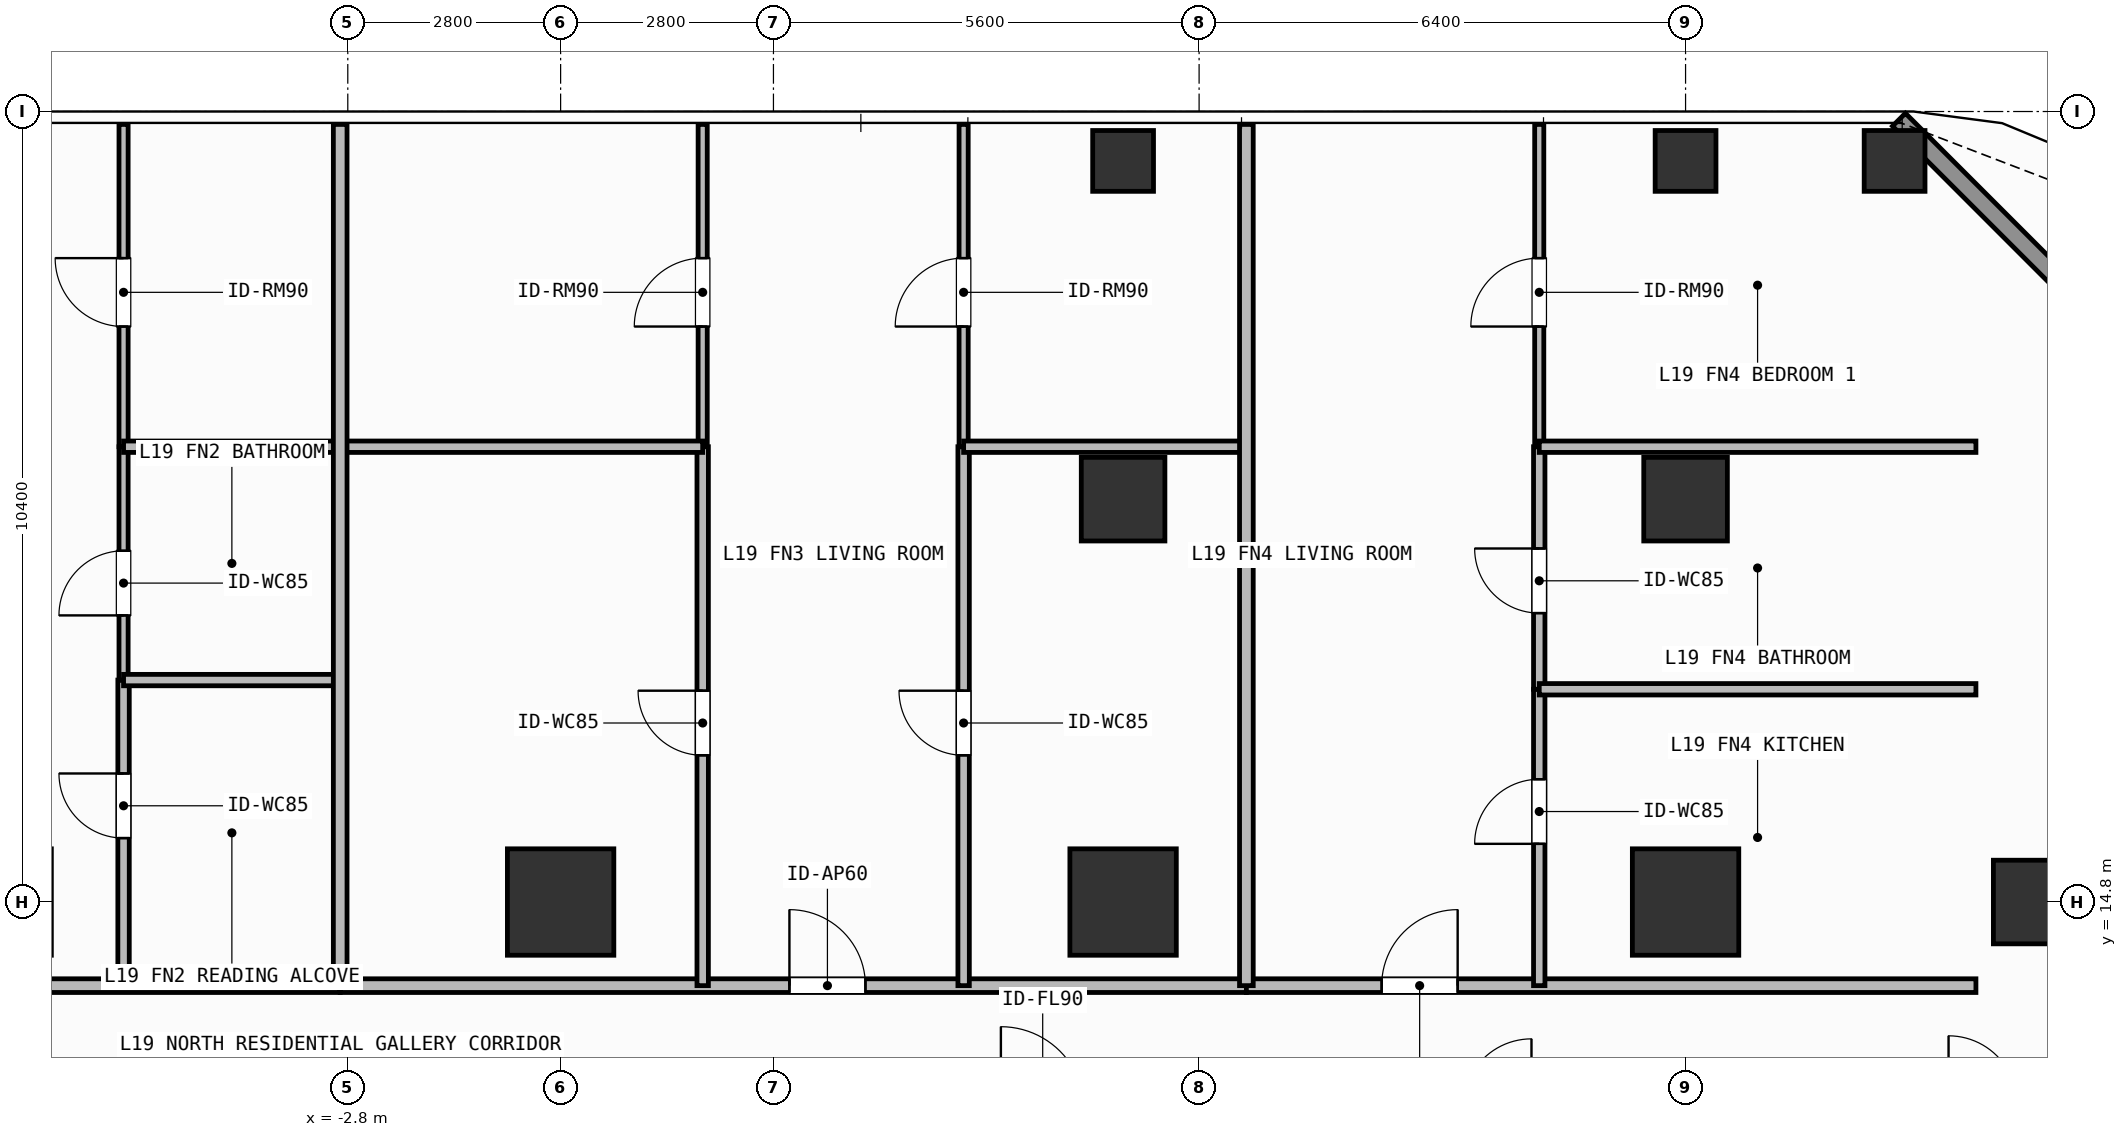
"""IFC4 building model, lengths in metres.
Left out: names, types, materials, properties, quantities, classifications, styles, units other than length and angle.
Written with IfcOpenShell. Run it as: python <this file> out.ifc"""

import sys

from ifc_helpers import new_model, si_unit, direction, frame, frame_2d, origin, origin_2d, place, context, subcontext, project, spatial, rectangle, hollow_rectangle, extrude, element, fill, save


model = new_model("IFC4")
c1 = context("Model", 3, precision=1e-05, world=origin(), true_north=direction((0.0, 1.0)))
c2 = subcontext(c1, "Body", "Model", "MODEL_VIEW")
j1 = project(units=[si_unit("LENGTHUNIT", "METRE"), si_unit("PLANEANGLEUNIT", "RADIAN")], contexts=[c1])
p1 = place(None, origin())
s1 = spatial("IfcSite", under=j1, at=p1, CompositionType="ELEMENT")
p2 = place(p1, origin())
s2 = spatial("IfcBuilding", under=s1, at=p2, CompositionType="ELEMENT")
p3 = place(p2, frame((0.0, 0.0, 73.5)))
s3 = spatial("IfcBuildingStorey", under=s2, at=p3, CompositionType="ELEMENT", Elevation=73.5)
for number, where, z_axis, x_axis in (
    (1, (0.0, 14.8, 0.0), (0.0, 0.0, 1.0), (1.0, 0.0, 0.0)),
    (2, (7.4, 14.8, 0.0), (0.0, 0.0, 1.0), (1.0, 0.0, 0.0)),
    (3, (14.8, 14.8, 0.0), (0.0, 0.0, 1.0), (1.0, 0.0, 0.0)),
):
    element("IfcColumn", number, at=place(p3, frame(where, z_axis=z_axis, x_axis=x_axis)), inside=s3, PredefinedType="COLUMN", context=c2, shape_type="SweptSolid", body=[
        extrude(rectangle(XDim=1.4, YDim=1.4, at=origin_2d()), origin(), (0.0, 0.0, 1.0), 3.9),
    ])
for number, where, z_axis, x_axis in (
    (4, (19.4, 14.8, 0.0), (0.0, 0.0, 1.0), (1.0, 0.0, 0.0)),
    (5, (7.4, 20.1, 0.0), (0.0, 0.0, 1.0), (1.0, 0.0, 0.0)),
    (6, (14.8, 20.1, 0.0), (0.0, 0.0, 1.0), (1.0, 0.0, 0.0)),
):
    element("IfcColumn", number, at=place(p3, frame(where, z_axis=z_axis, x_axis=x_axis)), inside=s3, PredefinedType="COLUMN", context=c2, shape_type="SweptSolid", body=[
        extrude(rectangle(XDim=1.1, YDim=1.1, at=origin_2d()), origin(), (0.0, 0.0, 1.0), 3.9),
    ])
for number, where, z_axis, x_axis in (
    (7, (17.55, 24.55, 0.0), (0.0, 0.0, 1.0), (1.0, 0.0, 0.0)),
    (8, (7.4, 24.55, 0.0), (0.0, 0.0, 1.0), (1.0, 0.0, 0.0)),
    (9, (14.8, 24.55, 0.0), (0.0, 0.0, 1.0), (1.0, 0.0, 0.0)),
):
    element("IfcColumn", number, at=place(p3, frame(where, z_axis=z_axis, x_axis=x_axis)), inside=s3, PredefinedType="COLUMN", context=c2, shape_type="SweptSolid", body=[
        extrude(hollow_rectangle(XDim=0.8, YDim=0.8, WallThickness=0.036, at=origin_2d()), origin(), (0.0, 0.0, 1.0), 3.9),
    ])
p4 = place(p3, frame((17.608, 25.092, 0.0), z_axis=(0.0, 0.0, 1.0), x_axis=(0.707106781187, -0.707106781187, 0.0)))
e10 = element("IfcWall", 10, at=p4, inside=s3, PredefinedType="SOLIDWALL", context=c2, shape_type="SweptSolid", body=[
    extrude(rectangle(XDim=6.484, YDim=0.24, at=frame_2d((3.242, 0.0))), origin(), (0.0, 0.0, 1.0), 3.6),
])
p5 = place(p3, frame((-14.951, 13.7, 0.0), z_axis=(0.0, 0.0, 1.0), x_axis=(1.0, 0.0, 0.0)))
e11 = element("IfcWall", 11, at=p5, inside=s3, PredefinedType="PARTITIONING", context=c2, shape_type="SweptSolid", body=[
    extrude(rectangle(XDim=12.051, YDim=0.18, at=frame_2d((6.025, 0.0))), origin(), (0.0, 0.0, 1.0), 3.6),
])
p6 = place(p5, frame((5.704, 0.0, 0.0)))
e12 = element("IfcOpeningElement", 12, at=p6, cuts=e11, PredefinedType="OPENING", context=c2, shape_type="SweptSolid", body=[
    extrude(rectangle(XDim=1.0, YDim=2.2, at=frame_2d((0.5, 1.1))), frame((0.0, 0.1, 0.0), z_axis=(0.0, -1.0, 0.0), x_axis=(1.0, 0.0, 0.0)), (0.0, 0.0, 1.0), 0.2),
])
p7 = place(p3, frame((-5.75, 13.7, 0.0), z_axis=(0.0, 0.0, 1.0), x_axis=(0.0, 1.0, 0.0)))
e13 = element("IfcWall", 13, at=p7, inside=s3, PredefinedType="PARTITIONING", context=c2, shape_type="SweptSolid", body=[
    extrude(rectangle(XDim=4.02, YDim=0.15, at=frame_2d((2.01, 0.0))), origin(), (0.0, 0.0, 1.0), 3.6),
])
p8 = place(p7, frame((1.941, 0.0, 0.0)))
e14 = element("IfcOpeningElement", 14, at=p8, cuts=e13, PredefinedType="OPENING", context=c2, shape_type="SweptSolid", body=[
    extrude(rectangle(XDim=0.85, YDim=2.1, at=frame_2d((0.425, 1.05))), frame((0.0, 0.085, 0.0), z_axis=(0.0, -1.0, 0.0), x_axis=(1.0, 0.0, 0.0)), (0.0, 0.0, 1.0), 0.17),
])
p9 = place(p3, frame((-5.75, 17.72, 0.0), z_axis=(0.0, 0.0, 1.0), x_axis=(0.0, 1.0, 0.0)))
e15 = element("IfcWall", 15, at=p9, inside=s3, PredefinedType="PARTITIONING", context=c2, shape_type="SweptSolid", body=[
    extrude(rectangle(XDim=3.07, YDim=0.12, at=frame_2d((1.535, 0.0))), origin(), (0.0, 0.0, 1.0), 3.6),
])
p10 = place(p9, frame((0.851, 0.0, 0.0)))
e16 = element("IfcOpeningElement", 16, at=p10, cuts=e15, PredefinedType="OPENING", context=c2, shape_type="SweptSolid", body=[
    extrude(rectangle(XDim=0.85, YDim=2.1, at=frame_2d((0.425, 1.05))), frame((0.0, 0.07, 0.0), z_axis=(0.0, -1.0, 0.0), x_axis=(1.0, 0.0, 0.0)), (0.0, 0.0, 1.0), 0.14),
])
p11 = place(p3, frame((-5.75, 20.79, 0.0), z_axis=(0.0, 0.0, 1.0), x_axis=(0.0, 1.0, 0.0)))
e17 = element("IfcWall", 17, at=p11, inside=s3, PredefinedType="PARTITIONING", context=c2, shape_type="SweptSolid", body=[
    extrude(rectangle(XDim=4.24, YDim=0.12, at=frame_2d((2.12, 0.0))), origin(), (0.0, 0.0, 1.0), 3.6),
])
p12 = place(p11, frame((1.581, 0.0, 0.0)))
e18 = element("IfcOpeningElement", 18, at=p12, cuts=e17, PredefinedType="OPENING", context=c2, shape_type="SweptSolid", body=[
    extrude(rectangle(XDim=0.9, YDim=2.1, at=frame_2d((0.45, 1.05))), frame((0.0, 0.07, 0.0), z_axis=(0.0, -1.0, 0.0), x_axis=(1.0, 0.0, 0.0)), (0.0, 0.0, 1.0), 0.14),
])
p13 = place(p3, frame((-2.9, 13.7, 0.0), z_axis=(0.0, 0.0, 1.0), x_axis=(1.0, 0.0, 0.0)))
e19 = element("IfcWall", 19, at=p13, inside=s3, PredefinedType="PARTITIONING", context=c2, shape_type="SweptSolid", body=[
    extrude(rectangle(XDim=11.922, YDim=0.18, at=frame_2d((5.961, 0.0))), origin(), (0.0, 0.0, 1.0), 3.6),
])
p14 = place(p13, frame((5.91, 0.0, 0.0)))
e20 = element("IfcOpeningElement", 20, at=p14, cuts=e19, PredefinedType="OPENING", context=c2, shape_type="SweptSolid", body=[
    extrude(rectangle(XDim=1.0, YDim=2.2, at=frame_2d((0.5, 1.1))), frame((0.0, 0.1, 0.0), z_axis=(0.0, -1.0, 0.0), x_axis=(1.0, 0.0, 0.0)), (0.0, 0.0, 1.0), 0.2),
])
p15 = place(p3, frame((1.869, 13.7, 0.0), z_axis=(0.0, 0.0, 1.0), x_axis=(0.0, 1.0, 0.0)))
e21 = element("IfcWall", 21, at=p15, inside=s3, PredefinedType="PARTITIONING", context=c2, shape_type="SweptSolid", body=[
    extrude(rectangle(XDim=7.09, YDim=0.15, at=frame_2d((3.545, 0.0))), origin(), (0.0, 0.0, 1.0), 3.6),
])
p16 = place(p15, frame((3.03, 0.0, 0.0)))
e22 = element("IfcOpeningElement", 22, at=p16, cuts=e21, PredefinedType="OPENING", context=c2, shape_type="SweptSolid", body=[
    extrude(rectangle(XDim=0.85, YDim=2.1, at=frame_2d((0.425, 1.05))), frame((0.0, 0.085, 0.0), z_axis=(0.0, -1.0, 0.0), x_axis=(1.0, 0.0, 0.0)), (0.0, 0.0, 1.0), 0.17),
])
p17 = place(p3, frame((1.869, 20.79, 0.0), z_axis=(0.0, 0.0, 1.0), x_axis=(0.0, 1.0, 0.0)))
e23 = element("IfcWall", 23, at=p17, inside=s3, PredefinedType="PARTITIONING", context=c2, shape_type="SweptSolid", body=[
    extrude(rectangle(XDim=4.24, YDim=0.12, at=frame_2d((2.12, 0.0))), origin(), (0.0, 0.0, 1.0), 3.6),
])
p18 = place(p17, frame((1.581, 0.0, 0.0)))
e24 = element("IfcOpeningElement", 24, at=p18, cuts=e23, PredefinedType="OPENING", context=c2, shape_type="SweptSolid", body=[
    extrude(rectangle(XDim=0.9, YDim=2.1, at=frame_2d((0.45, 1.05))), frame((0.0, 0.07, 0.0), z_axis=(0.0, -1.0, 0.0), x_axis=(1.0, 0.0, 0.0)), (0.0, 0.0, 1.0), 0.14),
])
p19 = place(p3, frame((5.302, 13.7, 0.0), z_axis=(0.0, 0.0, 1.0), x_axis=(0.0, 1.0, 0.0)))
e25 = element("IfcWall", 25, at=p19, inside=s3, PredefinedType="PARTITIONING", context=c2, shape_type="SweptSolid", body=[
    extrude(rectangle(XDim=7.09, YDim=0.15, at=frame_2d((3.545, 0.0))), origin(), (0.0, 0.0, 1.0), 3.6),
])
p20 = place(p19, frame((3.03, 0.0, 0.0)))
e26 = element("IfcOpeningElement", 26, at=p20, cuts=e25, PredefinedType="OPENING", context=c2, shape_type="SweptSolid", body=[
    extrude(rectangle(XDim=0.85, YDim=2.1, at=frame_2d((0.425, 1.05))), frame((0.0, 0.085, 0.0), z_axis=(0.0, -1.0, 0.0), x_axis=(1.0, 0.0, 0.0)), (0.0, 0.0, 1.0), 0.17),
])
p21 = place(p3, frame((5.302, 20.79, 0.0), z_axis=(0.0, 0.0, 1.0), x_axis=(0.0, 1.0, 0.0)))
e27 = element("IfcWall", 27, at=p21, inside=s3, PredefinedType="PARTITIONING", context=c2, shape_type="SweptSolid", body=[
    extrude(rectangle(XDim=4.24, YDim=0.12, at=frame_2d((2.12, 0.0))), origin(), (0.0, 0.0, 1.0), 3.6),
])
p22 = place(p21, frame((1.581, 0.0, 0.0)))
e28 = element("IfcOpeningElement", 28, at=p22, cuts=e27, PredefinedType="OPENING", context=c2, shape_type="SweptSolid", body=[
    extrude(rectangle(XDim=0.9, YDim=2.1, at=frame_2d((0.45, 1.05))), frame((0.0, 0.07, 0.0), z_axis=(0.0, -1.0, 0.0), x_axis=(1.0, 0.0, 0.0)), (0.0, 0.0, 1.0), 0.14),
])
p23 = place(p3, frame((9.022, 13.7, 0.0), z_axis=(0.0, 0.0, 1.0), x_axis=(1.0, 0.0, 0.0)))
e29 = element("IfcWall", 29, at=p23, inside=s3, PredefinedType="PARTITIONING", context=c2, shape_type="SweptSolid", body=[
    extrude(rectangle(XDim=9.598, YDim=0.18, at=frame_2d((4.799, 0.0))), origin(), (0.0, 0.0, 1.0), 3.6),
])
p24 = place(p23, frame((1.78, 0.0, 0.0)))
e30 = element("IfcOpeningElement", 30, at=p24, cuts=e29, PredefinedType="OPENING", context=c2, shape_type="SweptSolid", body=[
    extrude(rectangle(XDim=1.0, YDim=2.2, at=frame_2d((0.5, 1.1))), frame((0.0, 0.1, 0.0), z_axis=(0.0, -1.0, 0.0), x_axis=(1.0, 0.0, 0.0)), (0.0, 0.0, 1.0), 0.2),
])
p25 = place(p3, frame((12.875, 13.7, 0.0), z_axis=(0.0, 0.0, 1.0), x_axis=(0.0, 1.0, 0.0)))
e31 = element("IfcWall", 31, at=p25, inside=s3, PredefinedType="PARTITIONING", context=c2, shape_type="SweptSolid", body=[
    extrude(rectangle(XDim=3.899, YDim=0.15, at=frame_2d((1.95, 0.0))), origin(), (0.0, 0.0, 1.0), 3.6),
])
p26 = place(p25, frame((1.865, 0.0, 0.0)))
e32 = element("IfcOpeningElement", 32, at=p26, cuts=e31, PredefinedType="OPENING", context=c2, shape_type="SweptSolid", body=[
    extrude(rectangle(XDim=0.85, YDim=2.1, at=frame_2d((0.425, 1.05))), frame((0.0, 0.085, 0.0), z_axis=(0.0, -1.0, 0.0), x_axis=(1.0, 0.0, 0.0)), (0.0, 0.0, 1.0), 0.17),
])
p27 = place(p3, frame((12.875, 17.599, 0.0), z_axis=(0.0, 0.0, 1.0), x_axis=(0.0, 1.0, 0.0)))
e33 = element("IfcWall", 33, at=p27, inside=s3, PredefinedType="PARTITIONING", context=c2, shape_type="SweptSolid", body=[
    extrude(rectangle(XDim=3.191, YDim=0.15, at=frame_2d((1.595, 0.0))), origin(), (0.0, 0.0, 1.0), 3.6),
])
p28 = place(p27, frame((1.002, 0.0, 0.0)))
e34 = element("IfcOpeningElement", 34, at=p28, cuts=e33, PredefinedType="OPENING", context=c2, shape_type="SweptSolid", body=[
    extrude(rectangle(XDim=0.85, YDim=2.1, at=frame_2d((0.425, 1.05))), frame((0.0, 0.085, 0.0), z_axis=(0.0, -1.0, 0.0), x_axis=(1.0, 0.0, 0.0)), (0.0, 0.0, 1.0), 0.17),
])
p29 = place(p3, frame((12.875, 20.79, 0.0), z_axis=(0.0, 0.0, 1.0), x_axis=(0.0, 1.0, 0.0)))
e35 = element("IfcWall", 35, at=p29, inside=s3, PredefinedType="PARTITIONING", context=c2, shape_type="SweptSolid", body=[
    extrude(rectangle(XDim=4.24, YDim=0.12, at=frame_2d((2.12, 0.0))), origin(), (0.0, 0.0, 1.0), 3.6),
])
p30 = place(p29, frame((1.581, 0.0, 0.0)))
e36 = element("IfcOpeningElement", 36, at=p30, cuts=e35, PredefinedType="OPENING", context=c2, shape_type="SweptSolid", body=[
    extrude(rectangle(XDim=0.9, YDim=2.1, at=frame_2d((0.45, 1.05))), frame((0.0, 0.07, 0.0), z_axis=(0.0, -1.0, 0.0), x_axis=(1.0, 0.0, 0.0)), (0.0, 0.0, 1.0), 0.14),
])
for number, where, z_axis, x_axis in (
    (37, (-5.75, 17.72, 0.0), (0.0, 0.0, 1.0), (1.0, 0.0, 0.0)),
    (38, (-5.75, 20.79, 0.0), (0.0, 0.0, 1.0), (1.0, 0.0, 0.0)),
):
    element("IfcWall", number, at=place(p3, frame(where, z_axis=z_axis, x_axis=x_axis)), inside=s3, PredefinedType="PARTITIONING", context=c2, shape_type="SweptSolid", body=[
        extrude(rectangle(XDim=2.85, YDim=0.15, at=frame_2d((1.425, 0.0))), origin(), (0.0, 0.0, 1.0), 3.6),
    ])
p31 = place(p3, frame((-2.9, 20.79, 0.0), z_axis=(0.0, 0.0, 1.0), x_axis=(1.0, 0.0, 0.0)))
e39 = element("IfcWall", 39, at=p31, inside=s3, PredefinedType="PARTITIONING", context=c2, shape_type="SweptSolid", body=[
    extrude(rectangle(XDim=4.769, YDim=0.15, at=frame_2d((2.384, 0.0))), origin(), (0.0, 0.0, 1.0), 3.6),
])
p32 = place(p3, frame((5.302, 20.79, 0.0), z_axis=(0.0, 0.0, 1.0), x_axis=(1.0, 0.0, 0.0)))
e40 = element("IfcWall", 40, at=p32, inside=s3, PredefinedType="PARTITIONING", context=c2, shape_type="SweptSolid", body=[
    extrude(rectangle(XDim=3.72, YDim=0.15, at=frame_2d((1.86, 0.0))), origin(), (0.0, 0.0, 1.0), 3.6),
])
p33 = place(p3, frame((-2.9, 13.7, 0.0), z_axis=(0.0, 0.0, 1.0), x_axis=(0.0, 1.0, 0.0)))
e41 = element("IfcWall", 41, at=p33, inside=s3, PredefinedType="PARTITIONING", context=c2, shape_type="SweptSolid", body=[
    extrude(rectangle(XDim=11.33, YDim=0.18, at=frame_2d((5.665, 0.0))), origin(), (0.0, 0.0, 1.0), 3.6),
])
for number, where, z_axis, x_axis in (
    (42, (12.875, 17.599, 0.0), (0.0, 0.0, 1.0), (1.0, 0.0, 0.0)),
    (43, (12.875, 20.79, 0.0), (0.0, 0.0, 1.0), (1.0, 0.0, 0.0)),
):
    element("IfcWall", number, at=place(p3, frame(where, z_axis=z_axis, x_axis=x_axis)), inside=s3, PredefinedType="PARTITIONING", context=c2, shape_type="SweptSolid", body=[
        extrude(rectangle(XDim=5.745, YDim=0.15, at=frame_2d((2.873, 0.0))), origin(), (0.0, 0.0, 1.0), 3.6),
    ])
p34 = place(p3, frame((9.022, 13.7, 0.0), z_axis=(0.0, 0.0, 1.0), x_axis=(0.0, 1.0, 0.0)))
e44 = element("IfcWall", 44, at=p34, inside=s3, PredefinedType="PARTITIONING", context=c2, shape_type="SweptSolid", body=[
    extrude(rectangle(XDim=11.33, YDim=0.18, at=frame_2d((5.665, 0.0))), origin(), (0.0, 0.0, 1.0), 3.6),
])
p35 = place(p8, origin())
e45 = element("IfcDoor", 45, at=p35, inside=s3, OperationType="SINGLE_SWING_RIGHT", PredefinedType="DOOR", context=c2, shape_type="SweptSolid", body=[
    extrude(rectangle(XDim=0.85, YDim=2.1, at=frame_2d((0.425, 1.05))), frame((0.0, 0.025, 0.0), z_axis=(0.0, -1.0, 0.0), x_axis=(1.0, 0.0, 0.0)), (0.0, 0.0, 1.0), 0.05),
])
fill(e14, e45)
p36 = place(p10, origin())
e46 = element("IfcDoor", 46, at=p36, inside=s3, OperationType="SINGLE_SWING_LEFT", PredefinedType="DOOR", context=c2, shape_type="SweptSolid", body=[
    extrude(rectangle(XDim=0.85, YDim=2.1, at=frame_2d((0.425, 1.05))), frame((0.0, 0.025, 0.0), z_axis=(0.0, -1.0, 0.0), x_axis=(1.0, 0.0, 0.0)), (0.0, 0.0, 1.0), 0.05),
])
fill(e16, e46)
p37 = place(p12, origin())
e47 = element("IfcDoor", 47, at=p37, inside=s3, OperationType="SINGLE_SWING_RIGHT", PredefinedType="DOOR", context=c2, shape_type="SweptSolid", body=[
    extrude(rectangle(XDim=0.9, YDim=2.1, at=frame_2d((0.45, 1.05))), frame((0.0, 0.025, 0.0), z_axis=(0.0, -1.0, 0.0), x_axis=(1.0, 0.0, 0.0)), (0.0, 0.0, 1.0), 0.05),
])
fill(e18, e47)
p38 = place(p14, origin())
e48 = element("IfcDoor", 48, at=p38, inside=s3, OperationType="SINGLE_SWING_LEFT", PredefinedType="DOOR", context=c2, shape_type="SweptSolid", body=[
    extrude(rectangle(XDim=1.0, YDim=2.2, at=frame_2d((0.5, 1.1))), frame((0.0, 0.025, 0.0), z_axis=(0.0, -1.0, 0.0), x_axis=(1.0, 0.0, 0.0)), (0.0, 0.0, 1.0), 0.05),
])
fill(e20, e48)
p39 = place(p16, origin())
e49 = element("IfcDoor", 49, at=p39, inside=s3, OperationType="SINGLE_SWING_RIGHT", PredefinedType="DOOR", context=c2, shape_type="SweptSolid", body=[
    extrude(rectangle(XDim=0.85, YDim=2.1, at=frame_2d((0.425, 1.05))), frame((0.0, 0.025, 0.0), z_axis=(0.0, -1.0, 0.0), x_axis=(1.0, 0.0, 0.0)), (0.0, 0.0, 1.0), 0.05),
])
fill(e22, e49)
p40 = place(p18, origin())
e50 = element("IfcDoor", 50, at=p40, inside=s3, OperationType="SINGLE_SWING_LEFT", PredefinedType="DOOR", context=c2, shape_type="SweptSolid", body=[
    extrude(rectangle(XDim=0.9, YDim=2.1, at=frame_2d((0.45, 1.05))), frame((0.0, 0.025, 0.0), z_axis=(0.0, -1.0, 0.0), x_axis=(1.0, 0.0, 0.0)), (0.0, 0.0, 1.0), 0.05),
])
fill(e24, e50)
p41 = place(p20, origin())
e51 = element("IfcDoor", 51, at=p41, inside=s3, OperationType="SINGLE_SWING_RIGHT", PredefinedType="DOOR", context=c2, shape_type="SweptSolid", body=[
    extrude(rectangle(XDim=0.85, YDim=2.1, at=frame_2d((0.425, 1.05))), frame((0.0, 0.025, 0.0), z_axis=(0.0, -1.0, 0.0), x_axis=(1.0, 0.0, 0.0)), (0.0, 0.0, 1.0), 0.05),
])
fill(e26, e51)
p42 = place(p22, origin())
e52 = element("IfcDoor", 52, at=p42, inside=s3, OperationType="SINGLE_SWING_LEFT", PredefinedType="DOOR", context=c2, shape_type="SweptSolid", body=[
    extrude(rectangle(XDim=0.9, YDim=2.1, at=frame_2d((0.45, 1.05))), frame((0.0, 0.025, 0.0), z_axis=(0.0, -1.0, 0.0), x_axis=(1.0, 0.0, 0.0)), (0.0, 0.0, 1.0), 0.05),
])
fill(e28, e52)
p43 = place(p24, origin())
e53 = element("IfcDoor", 53, at=p43, inside=s3, OperationType="SINGLE_SWING_RIGHT", PredefinedType="DOOR", context=c2, shape_type="SweptSolid", body=[
    extrude(rectangle(XDim=1.0, YDim=2.2, at=frame_2d((0.5, 1.1))), frame((0.0, 0.025, 0.0), z_axis=(0.0, -1.0, 0.0), x_axis=(1.0, 0.0, 0.0)), (0.0, 0.0, 1.0), 0.05),
])
fill(e30, e53)
p44 = place(p26, origin())
e54 = element("IfcDoor", 54, at=p44, inside=s3, OperationType="SINGLE_SWING_LEFT", PredefinedType="DOOR", context=c2, shape_type="SweptSolid", body=[
    extrude(rectangle(XDim=0.85, YDim=2.1, at=frame_2d((0.425, 1.05))), frame((0.0, 0.025, 0.0), z_axis=(0.0, -1.0, 0.0), x_axis=(1.0, 0.0, 0.0)), (0.0, 0.0, 1.0), 0.05),
])
fill(e32, e54)
p45 = place(p28, origin())
e55 = element("IfcDoor", 55, at=p45, inside=s3, OperationType="SINGLE_SWING_RIGHT", PredefinedType="DOOR", context=c2, shape_type="SweptSolid", body=[
    extrude(rectangle(XDim=0.85, YDim=2.1, at=frame_2d((0.425, 1.05))), frame((0.0, 0.025, 0.0), z_axis=(0.0, -1.0, 0.0), x_axis=(1.0, 0.0, 0.0)), (0.0, 0.0, 1.0), 0.05),
])
fill(e34, e55)
p46 = place(p30, origin())
e56 = element("IfcDoor", 56, at=p46, inside=s3, OperationType="SINGLE_SWING_LEFT", PredefinedType="DOOR", context=c2, shape_type="SweptSolid", body=[
    extrude(rectangle(XDim=0.9, YDim=2.1, at=frame_2d((0.45, 1.05))), frame((0.0, 0.025, 0.0), z_axis=(0.0, -1.0, 0.0), x_axis=(1.0, 0.0, 0.0)), (0.0, 0.0, 1.0), 0.05),
])
fill(e36, e56)
save(model, sys.argv[1])
